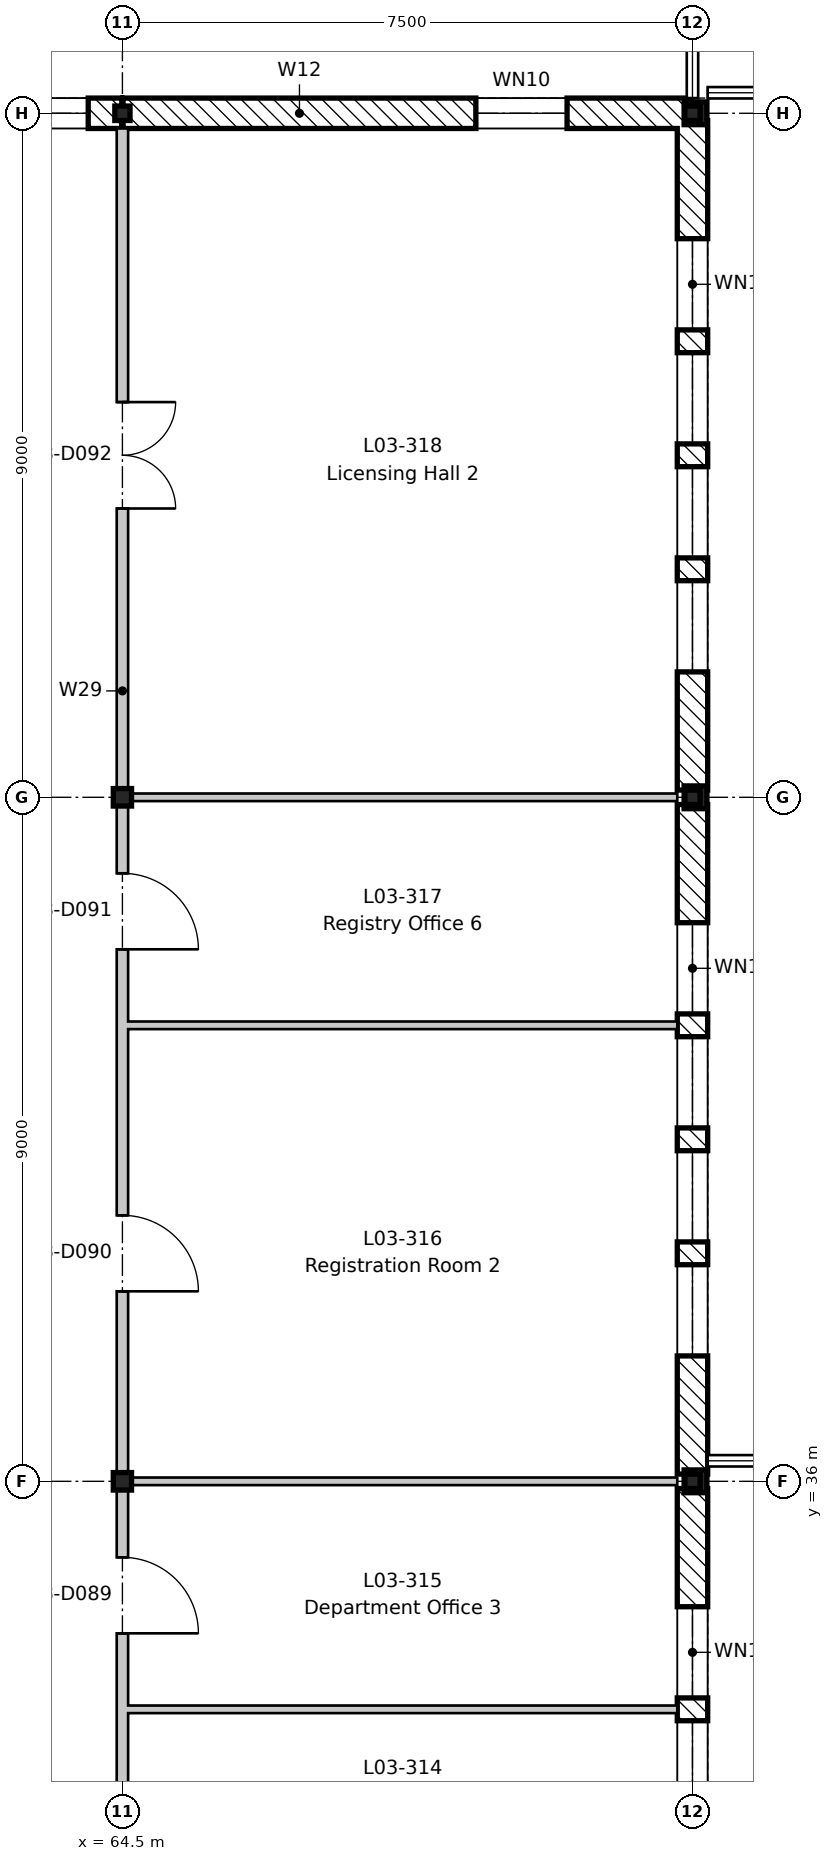
"""IFC4 building model, lengths in metres.
Left out: names, types, materials, properties, quantities, classifications, styles, units other than length and angle.
Written with IfcOpenShell. Run it as: python <this file> out.ifc"""

import sys

from ifc_helpers import new_model, si_unit, direction, frame, frame_2d, origin, origin_2d, place, context, subcontext, project, spatial, rectangle, i_section, extrude, element, fill, save


model = new_model("IFC4")
c1 = context("Model", 3, precision=1e-05, world=origin(), true_north=direction((0.0, 1.0)))
c2 = subcontext(c1, "Body", "Model", "MODEL_VIEW")
j1 = project(units=[si_unit("LENGTHUNIT", "METRE"), si_unit("PLANEANGLEUNIT", "RADIAN")], contexts=[c1])
p1 = place(None, origin())
s1 = spatial("IfcSite", under=j1, at=p1, CompositionType="ELEMENT")
p2 = place(p1, origin())
s2 = spatial("IfcBuilding", under=s1, at=p2, CompositionType="ELEMENT")
p3 = place(p2, frame((0.0, 0.0, 14.4)))
s3 = spatial("IfcBuildingStorey", under=s2, at=p3, CompositionType="ELEMENT", Elevation=14.4)
for number, where, z_axis, x_axis in (
    (1, (64.5, 36.0, -0.2), (0.0, 0.0, 1.0), (1.0, 0.0, 0.0)),
    (2, (64.5, 45.0, -0.2), (0.0, 0.0, 1.0), (1.0, 0.0, 0.0)),
):
    element("IfcColumn", number, at=place(p3, frame(where, z_axis=z_axis, x_axis=x_axis)), inside=s3, PredefinedType="COLUMN", context=c2, shape_type="SweptSolid", body=[
        extrude(i_section(OverallWidth=0.24, OverallDepth=0.23, WebThickness=0.008, FlangeThickness=0.012, FilletRadius=0.021, at=origin_2d()), origin(), (0.0, 0.0, 1.0), 4.15),
    ])
for number, where, z_axis, x_axis in (
    (3, (64.5, 54.0, -0.2), (0.0, 0.0, 1.0), (1.0, 0.0, 0.0)),
    (4, (72.0, 36.0, -0.2), (0.0, 0.0, 1.0), (1.0, 0.0, 0.0)),
    (5, (72.0, 45.0, -0.2), (0.0, 0.0, 1.0), (1.0, 0.0, 0.0)),
    (6, (72.0, 54.0, -0.2), (0.0, 0.0, 1.0), (1.0, 0.0, 0.0)),
):
    element("IfcColumn", number, at=place(p3, frame(where, z_axis=z_axis, x_axis=x_axis)), inside=s3, PredefinedType="COLUMN", context=c2, shape_type="SweptSolid", body=[
        extrude(i_section(OverallWidth=0.2, OverallDepth=0.19, WebThickness=0.007, FlangeThickness=0.01, FilletRadius=0.018, at=origin_2d()), origin(), (0.0, 0.0, 1.0), 4.15),
    ])
for number, where, z_axis, x_axis in (
    (7, (72.04, 36.0, 3.95), (0.0, 0.0, 1.0), (1.0, 0.0, 0.0)),
    (8, (72.04, 45.0, 3.95), (0.0, 0.0, 1.0), (1.0, 0.0, 0.0)),
    (9, (72.04, 54.0, 3.95), (0.0, 0.0, 1.0), (1.0, 0.0, 0.0)),
):
    element("IfcColumn", number, at=place(p3, frame(where, z_axis=z_axis, x_axis=x_axis)), inside=s3, PredefinedType="COLUMN", context=c2, shape_type="SweptSolid", body=[
        extrude(i_section(OverallWidth=0.3, OverallDepth=0.3, WebThickness=0.011, FlangeThickness=0.019, FilletRadius=0.027, at=origin_2d()), origin(), (0.0, 0.0, 1.0), 0.25),
    ])
p4 = place(p3, frame((61.508, 54.0, 0.0), z_axis=(0.0, 0.0, 1.0), x_axis=(1.0, 0.0, 0.0)))
e10 = element("IfcWall", 10, at=p4, inside=s3, PredefinedType="STANDARD", context=c2, shape_type="SweptSolid", body=[
    extrude(rectangle(XDim=2.983, YDim=0.4, at=frame_2d((1.492, 0.0))), origin(), (0.0, 0.0, 1.0), 3.75),
])
p5 = place(p4, frame((0.442, 0.0, 0.9)))
e11 = element("IfcOpeningElement", 11, at=p5, cuts=e10, PredefinedType="OPENING", context=c2, shape_type="SweptSolid", body=[
    extrude(rectangle(XDim=2.1, YDim=2.1, at=frame_2d((1.05, 1.05))), frame((0.0, 0.21, 0.0), z_axis=(0.0, -1.0, 0.0), x_axis=(1.0, 0.0, 0.0)), (0.0, 0.0, 1.0), 0.42),
])
p6 = place(p3, frame((64.508, 54.0, 0.0), z_axis=(0.0, 0.0, 1.0), x_axis=(1.0, 0.0, 0.0)))
e12 = element("IfcWall", 12, at=p6, inside=s3, PredefinedType="STANDARD", context=c2, shape_type="SweptSolid", body=[
    extrude(rectangle(XDim=7.483, YDim=0.4, at=frame_2d((3.742, 0.0))), origin(), (0.0, 0.0, 1.0), 3.62),
])
p7 = place(p6, frame((4.642, 0.0, 0.6)))
e13 = element("IfcOpeningElement", 13, at=p7, cuts=e12, PredefinedType="OPENING", context=c2, shape_type="SweptSolid", body=[
    extrude(rectangle(XDim=1.2, YDim=1.8, at=frame_2d((0.6, 0.9))), frame((0.0, 0.21, 0.0), z_axis=(0.0, -1.0, 0.0), x_axis=(1.0, 0.0, 0.0)), (0.0, 0.0, 1.0), 0.42),
])
p8 = place(p3, frame((72.0, 35.905, 0.0), z_axis=(0.0, 0.0, 1.0), x_axis=(0.0, -1.0, 0.0)))
e14 = element("IfcWall", 14, at=p8, inside=s3, PredefinedType="STANDARD", context=c2, shape_type="SweptSolid", body=[
    extrude(rectangle(XDim=8.81, YDim=0.4, at=frame_2d((4.405, 0.0))), origin(), (0.0, 0.0, 1.0), 3.55),
])
p9 = place(p8, frame((6.055, 0.0, 0.6)))
e15 = element("IfcOpeningElement", 15, at=p9, cuts=e14, PredefinedType="OPENING", context=c2, shape_type="SweptSolid", body=[
    extrude(rectangle(XDim=1.2, YDim=1.8, at=frame_2d((0.6, 0.9))), frame((0.0, 0.21, 0.0), z_axis=(0.0, -1.0, 0.0), x_axis=(1.0, 0.0, 0.0)), (0.0, 0.0, 1.0), 0.42),
])
p10 = place(p8, frame((4.555, 0.0, 0.6)))
e16 = element("IfcOpeningElement", 16, at=p10, cuts=e14, PredefinedType="OPENING", context=c2, shape_type="SweptSolid", body=[
    extrude(rectangle(XDim=1.2, YDim=1.8, at=frame_2d((0.6, 0.9))), frame((0.0, 0.21, 0.0), z_axis=(0.0, -1.0, 0.0), x_axis=(1.0, 0.0, 0.0)), (0.0, 0.0, 1.0), 0.42),
])
p11 = place(p8, frame((3.055, 0.0, 0.6)))
e17 = element("IfcOpeningElement", 17, at=p11, cuts=e14, PredefinedType="OPENING", context=c2, shape_type="SweptSolid", body=[
    extrude(rectangle(XDim=1.2, YDim=1.8, at=frame_2d((0.6, 0.9))), frame((0.0, 0.21, 0.0), z_axis=(0.0, -1.0, 0.0), x_axis=(1.0, 0.0, 0.0)), (0.0, 0.0, 1.0), 0.42),
])
p12 = place(p8, frame((1.555, 0.0, 0.6)))
e18 = element("IfcOpeningElement", 18, at=p12, cuts=e14, PredefinedType="OPENING", context=c2, shape_type="SweptSolid", body=[
    extrude(rectangle(XDim=1.2, YDim=1.8, at=frame_2d((0.6, 0.9))), frame((0.0, 0.21, 0.0), z_axis=(0.0, -1.0, 0.0), x_axis=(1.0, 0.0, 0.0)), (0.0, 0.0, 1.0), 0.42),
])
p13 = place(p3, frame((72.0, 44.905, 0.0), z_axis=(0.0, 0.0, 1.0), x_axis=(0.0, -1.0, 0.0)))
e19 = element("IfcWall", 19, at=p13, inside=s3, PredefinedType="STANDARD", context=c2, shape_type="SweptSolid", body=[
    extrude(rectangle(XDim=8.81, YDim=0.4, at=frame_2d((4.405, 0.0))), origin(), (0.0, 0.0, 1.0), 3.55),
])
p14 = place(p13, frame((6.055, 0.0, 0.6)))
e20 = element("IfcOpeningElement", 20, at=p14, cuts=e19, PredefinedType="OPENING", context=c2, shape_type="SweptSolid", body=[
    extrude(rectangle(XDim=1.2, YDim=1.8, at=frame_2d((0.6, 0.9))), frame((0.0, 0.21, 0.0), z_axis=(0.0, -1.0, 0.0), x_axis=(1.0, 0.0, 0.0)), (0.0, 0.0, 1.0), 0.42),
])
p15 = place(p13, frame((4.555, 0.0, 0.6)))
e21 = element("IfcOpeningElement", 21, at=p15, cuts=e19, PredefinedType="OPENING", context=c2, shape_type="SweptSolid", body=[
    extrude(rectangle(XDim=1.2, YDim=1.8, at=frame_2d((0.6, 0.9))), frame((0.0, 0.21, 0.0), z_axis=(0.0, -1.0, 0.0), x_axis=(1.0, 0.0, 0.0)), (0.0, 0.0, 1.0), 0.42),
])
p16 = place(p13, frame((3.055, 0.0, 0.6)))
e22 = element("IfcOpeningElement", 22, at=p16, cuts=e19, PredefinedType="OPENING", context=c2, shape_type="SweptSolid", body=[
    extrude(rectangle(XDim=1.2, YDim=1.8, at=frame_2d((0.6, 0.9))), frame((0.0, 0.21, 0.0), z_axis=(0.0, -1.0, 0.0), x_axis=(1.0, 0.0, 0.0)), (0.0, 0.0, 1.0), 0.42),
])
p17 = place(p13, frame((1.555, 0.0, 0.6)))
e23 = element("IfcOpeningElement", 23, at=p17, cuts=e19, PredefinedType="OPENING", context=c2, shape_type="SweptSolid", body=[
    extrude(rectangle(XDim=1.2, YDim=1.8, at=frame_2d((0.6, 0.9))), frame((0.0, 0.21, 0.0), z_axis=(0.0, -1.0, 0.0), x_axis=(1.0, 0.0, 0.0)), (0.0, 0.0, 1.0), 0.42),
])
p18 = place(p3, frame((72.0, 53.905, 0.0), z_axis=(0.0, 0.0, 1.0), x_axis=(0.0, -1.0, 0.0)))
e24 = element("IfcWall", 24, at=p18, inside=s3, PredefinedType="STANDARD", context=c2, shape_type="SweptSolid", body=[
    extrude(rectangle(XDim=8.81, YDim=0.4, at=frame_2d((4.405, 0.0))), origin(), (0.0, 0.0, 1.0), 3.55),
])
p19 = place(p18, frame((6.055, 0.0, 0.6)))
e25 = element("IfcOpeningElement", 25, at=p19, cuts=e24, PredefinedType="OPENING", context=c2, shape_type="SweptSolid", body=[
    extrude(rectangle(XDim=1.2, YDim=1.8, at=frame_2d((0.6, 0.9))), frame((0.0, 0.21, 0.0), z_axis=(0.0, -1.0, 0.0), x_axis=(1.0, 0.0, 0.0)), (0.0, 0.0, 1.0), 0.42),
])
p20 = place(p18, frame((4.555, 0.0, 0.6)))
e26 = element("IfcOpeningElement", 26, at=p20, cuts=e24, PredefinedType="OPENING", context=c2, shape_type="SweptSolid", body=[
    extrude(rectangle(XDim=1.2, YDim=1.8, at=frame_2d((0.6, 0.9))), frame((0.0, 0.21, 0.0), z_axis=(0.0, -1.0, 0.0), x_axis=(1.0, 0.0, 0.0)), (0.0, 0.0, 1.0), 0.42),
])
p21 = place(p18, frame((3.055, 0.0, 0.6)))
e27 = element("IfcOpeningElement", 27, at=p21, cuts=e24, PredefinedType="OPENING", context=c2, shape_type="SweptSolid", body=[
    extrude(rectangle(XDim=1.2, YDim=1.8, at=frame_2d((0.6, 0.9))), frame((0.0, 0.21, 0.0), z_axis=(0.0, -1.0, 0.0), x_axis=(1.0, 0.0, 0.0)), (0.0, 0.0, 1.0), 0.42),
])
p22 = place(p18, frame((1.555, 0.0, 0.6)))
e28 = element("IfcOpeningElement", 28, at=p22, cuts=e24, PredefinedType="OPENING", context=c2, shape_type="SweptSolid", body=[
    extrude(rectangle(XDim=1.2, YDim=1.8, at=frame_2d((0.6, 0.9))), frame((0.0, 0.21, 0.0), z_axis=(0.0, -1.0, 0.0), x_axis=(1.0, 0.0, 0.0)), (0.0, 0.0, 1.0), 0.42),
])
p23 = place(p3, frame((64.575, 33.0, 0.0), z_axis=(0.0, 0.0, 1.0), x_axis=(1.0, 0.0, 0.0)))
e29 = element("IfcWall", 29, at=p23, inside=s3, PredefinedType="PARTITIONING", context=c2, shape_type="SweptSolid", body=[
    extrude(rectangle(XDim=7.225, YDim=0.1, at=frame_2d((3.613, 0.0))), origin(), (0.0, 0.0, 1.0), 3.95),
])
p24 = place(p3, frame((64.575, 36.0, 0.0), z_axis=(0.0, 0.0, 1.0), x_axis=(1.0, 0.0, 0.0)))
e30 = element("IfcWall", 30, at=p24, inside=s3, PredefinedType="PARTITIONING", context=c2, shape_type="SweptSolid", body=[
    extrude(rectangle(XDim=7.225, YDim=0.1, at=frame_2d((3.613, 0.0))), origin(), (0.0, 0.0, 1.0), 3.6),
])
p25 = place(p3, frame((64.575, 42.0, 0.0), z_axis=(0.0, 0.0, 1.0), x_axis=(1.0, 0.0, 0.0)))
e31 = element("IfcWall", 31, at=p25, inside=s3, PredefinedType="PARTITIONING", context=c2, shape_type="SweptSolid", body=[
    extrude(rectangle(XDim=7.225, YDim=0.1, at=frame_2d((3.613, 0.0))), origin(), (0.0, 0.0, 1.0), 3.95),
])
p26 = place(p3, frame((64.575, 45.0, 0.0), z_axis=(0.0, 0.0, 1.0), x_axis=(1.0, 0.0, 0.0)))
e32 = element("IfcWall", 32, at=p26, inside=s3, PredefinedType="PARTITIONING", context=c2, shape_type="SweptSolid", body=[
    extrude(rectangle(XDim=7.225, YDim=0.1, at=frame_2d((3.613, 0.0))), origin(), (0.0, 0.0, 1.0), 3.6),
])
p27 = place(p3, frame((64.5, 0.2, 0.0), z_axis=(0.0, 0.0, 1.0), x_axis=(0.0, 1.0, 0.0)))
e33 = element("IfcWall", 33, at=p27, inside=s3, PredefinedType="PARTITIONING", context=c2, shape_type="SweptSolid", body=[
    extrude(rectangle(XDim=53.6, YDim=0.15, at=frame_2d((26.8, 0.0))), origin(), (0.0, 0.0, 1.0), 3.43),
])
p28 = place(p27, frame((2.3, 0.0, 0.0)))
e34 = element("IfcOpeningElement", 34, at=p28, cuts=e33, PredefinedType="OPENING", context=c2, shape_type="SweptSolid", body=[
    extrude(rectangle(XDim=1.0, YDim=2.1, at=frame_2d((0.5, 1.05))), frame((0.0, 0.085, 0.0), z_axis=(0.0, -1.0, 0.0), x_axis=(1.0, 0.0, 0.0)), (0.0, 0.0, 1.0), 0.17),
])
p29 = place(p27, frame((6.8, 0.0, 0.0)))
e35 = element("IfcOpeningElement", 35, at=p29, cuts=e33, PredefinedType="OPENING", context=c2, shape_type="SweptSolid", body=[
    extrude(rectangle(XDim=1.0, YDim=2.1, at=frame_2d((0.5, 1.05))), frame((0.0, 0.085, 0.0), z_axis=(0.0, -1.0, 0.0), x_axis=(1.0, 0.0, 0.0)), (0.0, 0.0, 1.0), 0.17),
])
p30 = place(p27, frame((12.6, 0.0, 0.0)))
e36 = element("IfcOpeningElement", 36, at=p30, cuts=e33, PredefinedType="OPENING", context=c2, shape_type="SweptSolid", body=[
    extrude(rectangle(XDim=1.4, YDim=2.1, at=frame_2d((0.7, 1.05))), frame((0.0, 0.085, 0.0), z_axis=(0.0, -1.0, 0.0), x_axis=(1.0, 0.0, 0.0)), (0.0, 0.0, 1.0), 0.17),
])
p31 = place(p27, frame((18.8, 0.0, 0.0)))
e37 = element("IfcOpeningElement", 37, at=p31, cuts=e33, PredefinedType="OPENING", context=c2, shape_type="SweptSolid", body=[
    extrude(rectangle(XDim=1.0, YDim=2.1, at=frame_2d((0.5, 1.05))), frame((0.0, 0.085, 0.0), z_axis=(0.0, -1.0, 0.0), x_axis=(1.0, 0.0, 0.0)), (0.0, 0.0, 1.0), 0.17),
])
p32 = place(p27, frame((23.3, 0.0, 0.0)))
e38 = element("IfcOpeningElement", 38, at=p32, cuts=e33, PredefinedType="OPENING", context=c2, shape_type="SweptSolid", body=[
    extrude(rectangle(XDim=1.0, YDim=2.1, at=frame_2d((0.5, 1.05))), frame((0.0, 0.085, 0.0), z_axis=(0.0, -1.0, 0.0), x_axis=(1.0, 0.0, 0.0)), (0.0, 0.0, 1.0), 0.17),
])
p33 = place(p27, frame((27.8, 0.0, 0.0)))
e39 = element("IfcOpeningElement", 39, at=p33, cuts=e33, PredefinedType="OPENING", context=c2, shape_type="SweptSolid", body=[
    extrude(rectangle(XDim=1.0, YDim=2.1, at=frame_2d((0.5, 1.05))), frame((0.0, 0.085, 0.0), z_axis=(0.0, -1.0, 0.0), x_axis=(1.0, 0.0, 0.0)), (0.0, 0.0, 1.0), 0.17),
])
p34 = place(p27, frame((30.8, 0.0, 0.0)))
e40 = element("IfcOpeningElement", 40, at=p34, cuts=e33, PredefinedType="OPENING", context=c2, shape_type="SweptSolid", body=[
    extrude(rectangle(XDim=1.0, YDim=2.1, at=frame_2d((0.5, 1.05))), frame((0.0, 0.085, 0.0), z_axis=(0.0, -1.0, 0.0), x_axis=(1.0, 0.0, 0.0)), (0.0, 0.0, 1.0), 0.17),
])
p35 = place(p27, frame((33.8, 0.0, 0.0)))
e41 = element("IfcOpeningElement", 41, at=p35, cuts=e33, PredefinedType="OPENING", context=c2, shape_type="SweptSolid", body=[
    extrude(rectangle(XDim=1.0, YDim=2.1, at=frame_2d((0.5, 1.05))), frame((0.0, 0.085, 0.0), z_axis=(0.0, -1.0, 0.0), x_axis=(1.0, 0.0, 0.0)), (0.0, 0.0, 1.0), 0.17),
])
p36 = place(p27, frame((38.3, 0.0, 0.0)))
e42 = element("IfcOpeningElement", 42, at=p36, cuts=e33, PredefinedType="OPENING", context=c2, shape_type="SweptSolid", body=[
    extrude(rectangle(XDim=1.0, YDim=2.1, at=frame_2d((0.5, 1.05))), frame((0.0, 0.085, 0.0), z_axis=(0.0, -1.0, 0.0), x_axis=(1.0, 0.0, 0.0)), (0.0, 0.0, 1.0), 0.17),
])
p37 = place(p27, frame((42.8, 0.0, 0.0)))
e43 = element("IfcOpeningElement", 43, at=p37, cuts=e33, PredefinedType="OPENING", context=c2, shape_type="SweptSolid", body=[
    extrude(rectangle(XDim=1.0, YDim=2.1, at=frame_2d((0.5, 1.05))), frame((0.0, 0.085, 0.0), z_axis=(0.0, -1.0, 0.0), x_axis=(1.0, 0.0, 0.0)), (0.0, 0.0, 1.0), 0.17),
])
p38 = place(p27, frame((48.6, 0.0, 0.0)))
e44 = element("IfcOpeningElement", 44, at=p38, cuts=e33, PredefinedType="OPENING", context=c2, shape_type="SweptSolid", body=[
    extrude(rectangle(XDim=1.4, YDim=2.1, at=frame_2d((0.7, 1.05))), frame((0.0, 0.085, 0.0), z_axis=(0.0, -1.0, 0.0), x_axis=(1.0, 0.0, 0.0)), (0.0, 0.0, 1.0), 0.17),
])
p39 = place(p5, origin())
e45 = element("IfcWindow", 45, at=p39, inside=s3, PartitioningType="SINGLE_PANEL", PredefinedType="WINDOW", context=c2, shape_type="SweptSolid", body=[
    extrude(rectangle(XDim=2.1, YDim=2.1, at=frame_2d((1.05, 1.05))), frame((0.0, 0.03, 0.0), z_axis=(0.0, -1.0, 0.0), x_axis=(1.0, 0.0, 0.0)), (0.0, 0.0, 1.0), 0.06),
])
fill(e11, e45)
p40 = place(p7, origin())
e46 = element("IfcWindow", 46, at=p40, inside=s3, PartitioningType="SINGLE_PANEL", PredefinedType="WINDOW", context=c2, shape_type="SweptSolid", body=[
    extrude(rectangle(XDim=1.2, YDim=1.8, at=frame_2d((0.6, 0.9))), frame((0.0, 0.03, 0.0), z_axis=(0.0, -1.0, 0.0), x_axis=(1.0, 0.0, 0.0)), (0.0, 0.0, 1.0), 0.06),
])
fill(e13, e46)
p41 = place(p11, origin())
e47 = element("IfcWindow", 47, at=p41, inside=s3, PartitioningType="SINGLE_PANEL", PredefinedType="WINDOW", context=c2, shape_type="SweptSolid", body=[
    extrude(rectangle(XDim=1.2, YDim=1.8, at=frame_2d((0.6, 0.9))), frame((0.0, 0.03, 0.0), z_axis=(0.0, -1.0, 0.0), x_axis=(1.0, 0.0, 0.0)), (0.0, 0.0, 1.0), 0.06),
])
fill(e17, e47)
p42 = place(p12, origin())
e48 = element("IfcWindow", 48, at=p42, inside=s3, PartitioningType="SINGLE_PANEL", PredefinedType="WINDOW", context=c2, shape_type="SweptSolid", body=[
    extrude(rectangle(XDim=1.2, YDim=1.8, at=frame_2d((0.6, 0.9))), frame((0.0, 0.03, 0.0), z_axis=(0.0, -1.0, 0.0), x_axis=(1.0, 0.0, 0.0)), (0.0, 0.0, 1.0), 0.06),
])
fill(e18, e48)
p43 = place(p14, origin())
e49 = element("IfcWindow", 49, at=p43, inside=s3, PartitioningType="SINGLE_PANEL", PredefinedType="WINDOW", context=c2, shape_type="SweptSolid", body=[
    extrude(rectangle(XDim=1.2, YDim=1.8, at=frame_2d((0.6, 0.9))), frame((0.0, 0.03, 0.0), z_axis=(0.0, -1.0, 0.0), x_axis=(1.0, 0.0, 0.0)), (0.0, 0.0, 1.0), 0.06),
])
fill(e20, e49)
p44 = place(p15, origin())
e50 = element("IfcWindow", 50, at=p44, inside=s3, PartitioningType="SINGLE_PANEL", PredefinedType="WINDOW", context=c2, shape_type="SweptSolid", body=[
    extrude(rectangle(XDim=1.2, YDim=1.8, at=frame_2d((0.6, 0.9))), frame((0.0, 0.03, 0.0), z_axis=(0.0, -1.0, 0.0), x_axis=(1.0, 0.0, 0.0)), (0.0, 0.0, 1.0), 0.06),
])
fill(e21, e50)
p45 = place(p16, origin())
e51 = element("IfcWindow", 51, at=p45, inside=s3, PartitioningType="SINGLE_PANEL", PredefinedType="WINDOW", context=c2, shape_type="SweptSolid", body=[
    extrude(rectangle(XDim=1.2, YDim=1.8, at=frame_2d((0.6, 0.9))), frame((0.0, 0.03, 0.0), z_axis=(0.0, -1.0, 0.0), x_axis=(1.0, 0.0, 0.0)), (0.0, 0.0, 1.0), 0.06),
])
fill(e22, e51)
p46 = place(p17, origin())
e52 = element("IfcWindow", 52, at=p46, inside=s3, PartitioningType="SINGLE_PANEL", PredefinedType="WINDOW", context=c2, shape_type="SweptSolid", body=[
    extrude(rectangle(XDim=1.2, YDim=1.8, at=frame_2d((0.6, 0.9))), frame((0.0, 0.03, 0.0), z_axis=(0.0, -1.0, 0.0), x_axis=(1.0, 0.0, 0.0)), (0.0, 0.0, 1.0), 0.06),
])
fill(e23, e52)
p47 = place(p19, origin())
e53 = element("IfcWindow", 53, at=p47, inside=s3, PartitioningType="SINGLE_PANEL", PredefinedType="WINDOW", context=c2, shape_type="SweptSolid", body=[
    extrude(rectangle(XDim=1.2, YDim=1.8, at=frame_2d((0.6, 0.9))), frame((0.0, 0.03, 0.0), z_axis=(0.0, -1.0, 0.0), x_axis=(1.0, 0.0, 0.0)), (0.0, 0.0, 1.0), 0.06),
])
fill(e25, e53)
p48 = place(p20, origin())
e54 = element("IfcWindow", 54, at=p48, inside=s3, PartitioningType="SINGLE_PANEL", PredefinedType="WINDOW", context=c2, shape_type="SweptSolid", body=[
    extrude(rectangle(XDim=1.2, YDim=1.8, at=frame_2d((0.6, 0.9))), frame((0.0, 0.03, 0.0), z_axis=(0.0, -1.0, 0.0), x_axis=(1.0, 0.0, 0.0)), (0.0, 0.0, 1.0), 0.06),
])
fill(e26, e54)
p49 = place(p21, origin())
e55 = element("IfcWindow", 55, at=p49, inside=s3, PartitioningType="SINGLE_PANEL", PredefinedType="WINDOW", context=c2, shape_type="SweptSolid", body=[
    extrude(rectangle(XDim=1.2, YDim=1.8, at=frame_2d((0.6, 0.9))), frame((0.0, 0.03, 0.0), z_axis=(0.0, -1.0, 0.0), x_axis=(1.0, 0.0, 0.0)), (0.0, 0.0, 1.0), 0.06),
])
fill(e27, e55)
p50 = place(p22, origin())
e56 = element("IfcWindow", 56, at=p50, inside=s3, PartitioningType="SINGLE_PANEL", PredefinedType="WINDOW", context=c2, shape_type="SweptSolid", body=[
    extrude(rectangle(XDim=1.2, YDim=1.8, at=frame_2d((0.6, 0.9))), frame((0.0, 0.03, 0.0), z_axis=(0.0, -1.0, 0.0), x_axis=(1.0, 0.0, 0.0)), (0.0, 0.0, 1.0), 0.06),
])
fill(e28, e56)
p51 = place(p35, frame((1.0, 0.0, 0.0), z_axis=(0.0, 0.0, 1.0), x_axis=(-1.0, 0.0, 0.0)))
e57 = element("IfcDoor", 57, at=p51, inside=s3, OperationType="SINGLE_SWING_RIGHT", PredefinedType="DOOR", context=c2, shape_type="SweptSolid", body=[
    extrude(rectangle(XDim=1.0, YDim=2.1, at=frame_2d((0.5, 1.05))), frame((0.0, 0.025, 0.0), z_axis=(0.0, -1.0, 0.0), x_axis=(1.0, 0.0, 0.0)), (0.0, 0.0, 1.0), 0.05),
])
fill(e41, e57)
p52 = place(p36, frame((1.0, 0.0, 0.0), z_axis=(0.0, 0.0, 1.0), x_axis=(-1.0, 0.0, 0.0)))
e58 = element("IfcDoor", 58, at=p52, inside=s3, OperationType="SINGLE_SWING_RIGHT", PredefinedType="DOOR", context=c2, shape_type="SweptSolid", body=[
    extrude(rectangle(XDim=1.0, YDim=2.1, at=frame_2d((0.5, 1.05))), frame((0.0, 0.025, 0.0), z_axis=(0.0, -1.0, 0.0), x_axis=(1.0, 0.0, 0.0)), (0.0, 0.0, 1.0), 0.05),
])
fill(e42, e58)
p53 = place(p37, frame((1.0, 0.0, 0.0), z_axis=(0.0, 0.0, 1.0), x_axis=(-1.0, 0.0, 0.0)))
e59 = element("IfcDoor", 59, at=p53, inside=s3, OperationType="SINGLE_SWING_RIGHT", PredefinedType="DOOR", context=c2, shape_type="SweptSolid", body=[
    extrude(rectangle(XDim=1.0, YDim=2.1, at=frame_2d((0.5, 1.05))), frame((0.0, 0.025, 0.0), z_axis=(0.0, -1.0, 0.0), x_axis=(1.0, 0.0, 0.0)), (0.0, 0.0, 1.0), 0.05),
])
fill(e43, e59)
p54 = place(p38, frame((1.4, 0.0, 0.0), z_axis=(0.0, 0.0, 1.0), x_axis=(-1.0, 0.0, 0.0)))
e60 = element("IfcDoor", 60, at=p54, inside=s3, OperationType="DOUBLE_DOOR_SINGLE_SWING", PredefinedType="DOOR", context=c2, shape_type="SweptSolid", body=[
    extrude(rectangle(XDim=1.4, YDim=2.1, at=frame_2d((0.7, 1.05))), frame((0.0, 0.025, 0.0), z_axis=(0.0, -1.0, 0.0), x_axis=(1.0, 0.0, 0.0)), (0.0, 0.0, 1.0), 0.05),
])
fill(e44, e60)
save(model, sys.argv[1])
